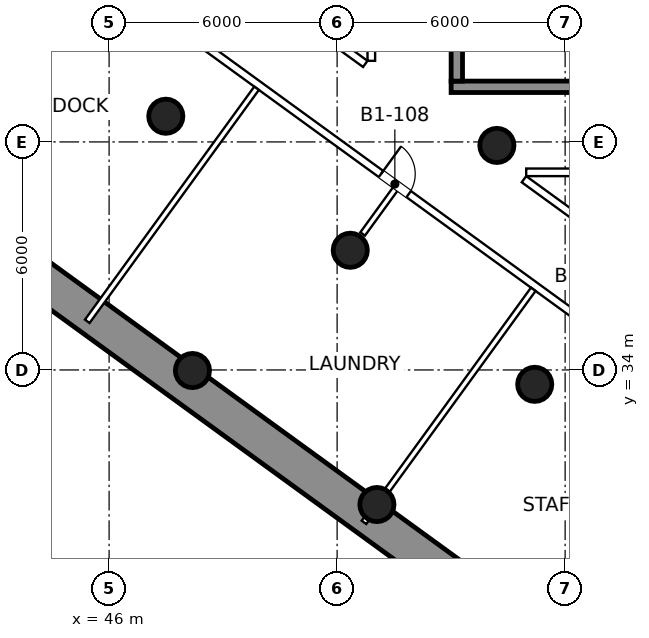
"""IFC4 building model, lengths in metres.
Left out: names, types, materials, properties, quantities, classifications, styles, units other than length and angle.
Written with IfcOpenShell. Run it as: python <this file> out.ifc"""

import sys

from ifc_helpers import new_model, si_unit, direction, frame, frame_2d, origin, origin_2d, place, context, subcontext, project, spatial, rectangle, circle, extrude, element, fill, save


model = new_model("IFC4")
c1 = context("Model", 3, precision=1e-05, world=origin(), true_north=direction((0.0, 1.0)))
c2 = subcontext(c1, "Body", "Model", "MODEL_VIEW")
j1 = project(units=[si_unit("LENGTHUNIT", "METRE"), si_unit("PLANEANGLEUNIT", "RADIAN")], contexts=[c1])
p1 = place(None, origin())
s1 = spatial("IfcSite", under=j1, at=p1, CompositionType="ELEMENT")
p2 = place(p1, origin())
s2 = spatial("IfcBuilding", under=s1, at=p2, CompositionType="ELEMENT")
p3 = place(p2, frame((0.0, 0.0, -5.0)))
s3 = spatial("IfcBuildingStorey", under=s2, at=p3, CompositionType="ELEMENT", Elevation=-5.0)
p4 = place(p3, frame((60.76, 24.361, 0.0), z_axis=(0.0, 0.0, 1.0), x_axis=(-0.809018883304, 0.587782652396, 0.0)))
e1 = element("IfcWall", 1, at=p4, inside=s3, PredefinedType="SOLIDWALL", context=c2, shape_type="SweptSolid", body=[
    extrude(rectangle(XDim=31.647, YDim=1.0, at=frame_2d((15.823, 0.0))), origin(), (0.0, 0.0, 1.0), 4.55),
])
for number, where, z_axis, x_axis in (
    (2, (48.193, 33.985, 0.0), (0.0, 0.0, 1.0), (1.0, 0.0, 0.0)),
    (3, (53.047, 30.459, 0.0), (0.0, 0.0, 1.0), (1.0, 0.0, 0.0)),
    (4, (47.492, 40.676, 0.0), (0.0, 0.0, 1.0), (1.0, 0.0, 0.0)),
    (5, (52.346, 37.149, 0.0), (0.0, 0.0, 1.0), (1.0, 0.0, 0.0)),
    (6, (57.2, 33.622, 0.0), (0.0, 0.0, 1.0), (1.0, 0.0, 0.0)),
    (7, (56.204, 39.908, 0.0), (0.0, 0.0, 1.0), (1.0, 0.0, 0.0)),
):
    element("IfcColumn", number, at=place(p3, frame(where, z_axis=z_axis, x_axis=x_axis)), inside=s3, PredefinedType="COLUMN", context=c2, shape_type="SweptSolid", body=[
        extrude(circle(Radius=0.45, at=origin_2d()), origin(), (0.0, 0.0, 1.0), 5.0),
    ])
p5 = place(p3, frame((55.0, 41.45, 0.0), z_axis=(0.0, 0.0, 1.0), x_axis=(1.0, 0.0, 0.0)))
e8 = element("IfcWall", 8, at=p5, inside=s3, PredefinedType="SHEAR", context=c2, shape_type="SweptSolid", body=[
    extrude(rectangle(XDim=11.9, YDim=0.3, at=frame_2d((5.95, 0.0))), origin(), (0.0, 0.0, 1.0), 4.55),
])
p6 = place(p3, frame((55.15, 41.6, 0.0), z_axis=(0.0, 0.0, 1.0), x_axis=(0.0, 1.0, 0.0)))
e9 = element("IfcWall", 9, at=p6, inside=s3, PredefinedType="SHEAR", context=c2, shape_type="SweptSolid", body=[
    extrude(rectangle(XDim=3.75, YDim=0.3, at=frame_2d((1.875, 0.0))), origin(), (0.0, 0.0, 1.0), 4.55),
])
p7 = place(p3, frame((63.17, 31.88, 0.0), z_axis=(0.0, 0.0, 1.0), x_axis=(-0.809016646189, 0.587785731529, 0.0)))
e10 = element("IfcWall", 10, at=p7, inside=s3, PredefinedType="PARTITIONING", context=c2, shape_type="SweptSolid", body=[
    extrude(rectangle(XDim=26.708, YDim=0.2, at=frame_2d((13.354, 0.0))), origin(), (0.0, 0.0, 1.0), 4.55),
])
p8 = place(p7, frame((21.097, 0.0, 0.0)))
e11 = element("IfcOpeningElement", 11, at=p8, cuts=e10, PredefinedType="OPENING", context=c2, shape_type="SweptSolid", body=[
    extrude(rectangle(XDim=0.9, YDim=2.1, at=frame_2d((0.45, 1.05))), frame((0.0, 0.11, 0.0), z_axis=(0.0, -1.0, 0.0), x_axis=(1.0, 0.0, 0.0)), (0.0, 0.0, 1.0), 0.22),
])
p9 = place(p7, frame((11.479, 0.0, 0.0)))
e12 = element("IfcOpeningElement", 12, at=p9, cuts=e10, PredefinedType="OPENING", context=c2, shape_type="SweptSolid", body=[
    extrude(rectangle(XDim=0.9, YDim=2.1, at=frame_2d((0.45, 1.05))), frame((0.0, 0.11, 0.0), z_axis=(0.0, -1.0, 0.0), x_axis=(1.0, 0.0, 0.0)), (0.0, 0.0, 1.0), 0.22),
])
p10 = place(p7, frame((3.211, 0.0, 0.0)))
e13 = element("IfcOpeningElement", 13, at=p10, cuts=e10, PredefinedType="OPENING", context=c2, shape_type="SweptSolid", body=[
    extrude(rectangle(XDim=0.9, YDim=2.1, at=frame_2d((0.45, 1.05))), frame((0.0, 0.11, 0.0), z_axis=(0.0, -1.0, 0.0), x_axis=(1.0, 0.0, 0.0)), (0.0, 0.0, 1.0), 0.22),
])
p11 = place(p3, frame((43.349, 48.877, 0.0), z_axis=(0.0, 0.0, 1.0), x_axis=(0.809017904923, -0.587783999028, 0.0)))
e14 = element("IfcWall", 14, at=p11, inside=s3, PredefinedType="PARTITIONING", context=c2, shape_type="SweptSolid", body=[
    extrude(rectangle(XDim=11.609, YDim=0.2, at=frame_2d((5.805, 0.0))), origin(), (0.0, 0.0, 1.0), 3.85),
])
p12 = place(p11, frame((5.436, 0.0, 0.0)))
e15 = element("IfcOpeningElement", 15, at=p12, cuts=e14, PredefinedType="OPENING", context=c2, shape_type="SweptSolid", body=[
    extrude(rectangle(XDim=0.9, YDim=2.1, at=frame_2d((0.45, 1.05))), frame((0.0, 0.11, 0.0), z_axis=(0.0, -1.0, 0.0), x_axis=(1.0, 0.0, 0.0)), (0.0, 0.0, 1.0), 0.22),
])
p13 = place(p3, frame((52.9, 42.134, 0.0), z_axis=(0.0, 0.0, 1.0), x_axis=(0.0, 1.0, 0.0)))
e16 = element("IfcWall", 16, at=p13, inside=s3, PredefinedType="PARTITIONING", context=c2, shape_type="SweptSolid", body=[
    extrude(rectangle(XDim=5.586, YDim=0.2, at=frame_2d((2.793, 0.0))), origin(), (0.0, 0.0, 1.0), 3.85),
])
p14 = place(p3, frame((68.85, 39.2, 0.0), z_axis=(0.0, 0.0, 1.0), x_axis=(-1.0, 0.0, 0.0)))
e17 = element("IfcWall", 17, at=p14, inside=s3, PredefinedType="PARTITIONING", context=c2, shape_type="SweptSolid", body=[
    extrude(rectangle(XDim=11.875, YDim=0.2, at=frame_2d((5.937, 0.0))), origin(), (0.0, 0.0, 1.0), 3.85),
])
p15 = place(p14, frame((2.406, 0.0, 0.0)))
e18 = element("IfcOpeningElement", 18, at=p15, cuts=e17, PredefinedType="OPENING", context=c2, shape_type="SweptSolid", body=[
    extrude(rectangle(XDim=0.9, YDim=2.1, at=frame_2d((0.45, 1.05))), frame((0.0, 0.11, 0.0), z_axis=(0.0, -1.0, 0.0), x_axis=(1.0, 0.0, 0.0)), (0.0, 0.0, 1.0), 0.22),
])
p16 = place(p3, frame((56.917, 39.019, 0.0), z_axis=(0.0, 0.0, 1.0), x_axis=(0.809015553327, -0.58778723572, 0.0)))
e19 = element("IfcWall", 19, at=p16, inside=s3, PredefinedType="PARTITIONING", context=c2, shape_type="SweptSolid", body=[
    extrude(rectangle(XDim=8.573, YDim=0.2, at=frame_2d((4.286, 0.0))), origin(), (0.0, 0.0, 1.0), 3.85),
])
p17 = place(p16, frame((3.179, 0.0, 0.0)))
e20 = element("IfcOpeningElement", 20, at=p17, cuts=e19, PredefinedType="OPENING", context=c2, shape_type="SweptSolid", body=[
    extrude(rectangle(XDim=0.9, YDim=2.1, at=frame_2d((0.45, 1.05))), frame((0.0, 0.11, 0.0), z_axis=(0.0, -1.0, 0.0), x_axis=(1.0, 0.0, 0.0)), (0.0, 0.0, 1.0), 0.22),
])
p18 = place(p3, frame((45.425, 35.28, 0.0), z_axis=(0.0, 0.0, 1.0), x_axis=(0.587779028788, 0.809021515979, 0.0)))
e21 = element("IfcWall", 21, at=p18, inside=s3, PredefinedType="PARTITIONING", context=c2, shape_type="SweptSolid", body=[
    extrude(rectangle(XDim=7.58, YDim=0.15, at=frame_2d((3.79, 0.0))), origin(), (0.0, 0.0, 1.0), 3.85),
])
p19 = place(p3, frame((52.706, 29.99, 0.0), z_axis=(0.0, 0.0, 1.0), x_axis=(0.587800109381, 0.80900619986, 0.0)))
e22 = element("IfcWall", 22, at=p19, inside=s3, PredefinedType="PARTITIONING", context=c2, shape_type="SweptSolid", body=[
    extrude(rectangle(XDim=7.58, YDim=0.15, at=frame_2d((3.79, 0.0))), origin(), (0.0, 0.0, 1.0), 3.85),
])
p20 = place(p3, frame((52.673, 37.579, 0.0), z_axis=(0.0, 0.0, 1.0), x_axis=(0.58775391966, 0.809039757938, 0.0)))
e23 = element("IfcWall", 23, at=p20, inside=s3, PredefinedType="PARTITIONING", context=c2, shape_type="SweptSolid", body=[
    extrude(rectangle(XDim=1.46, YDim=0.15, at=frame_2d((0.73, 0.0))), origin(), (0.0, 0.0, 1.0), 4.55),
])
p21 = place(p9, frame((0.9, 0.0, 0.0), z_axis=(0.0, 0.0, 1.0), x_axis=(-1.0, 0.0, 0.0)))
e24 = element("IfcDoor", 24, at=p21, inside=s3, OperationType="SINGLE_SWING_LEFT", PredefinedType="DOOR", context=c2, shape_type="SweptSolid", body=[
    extrude(rectangle(XDim=0.9, YDim=2.1, at=frame_2d((0.45, 1.05))), frame((0.0, 0.025, 0.0), z_axis=(0.0, -1.0, 0.0), x_axis=(1.0, 0.0, 0.0)), (0.0, 0.0, 1.0), 0.05),
])
fill(e12, e24)
save(model, sys.argv[1])
